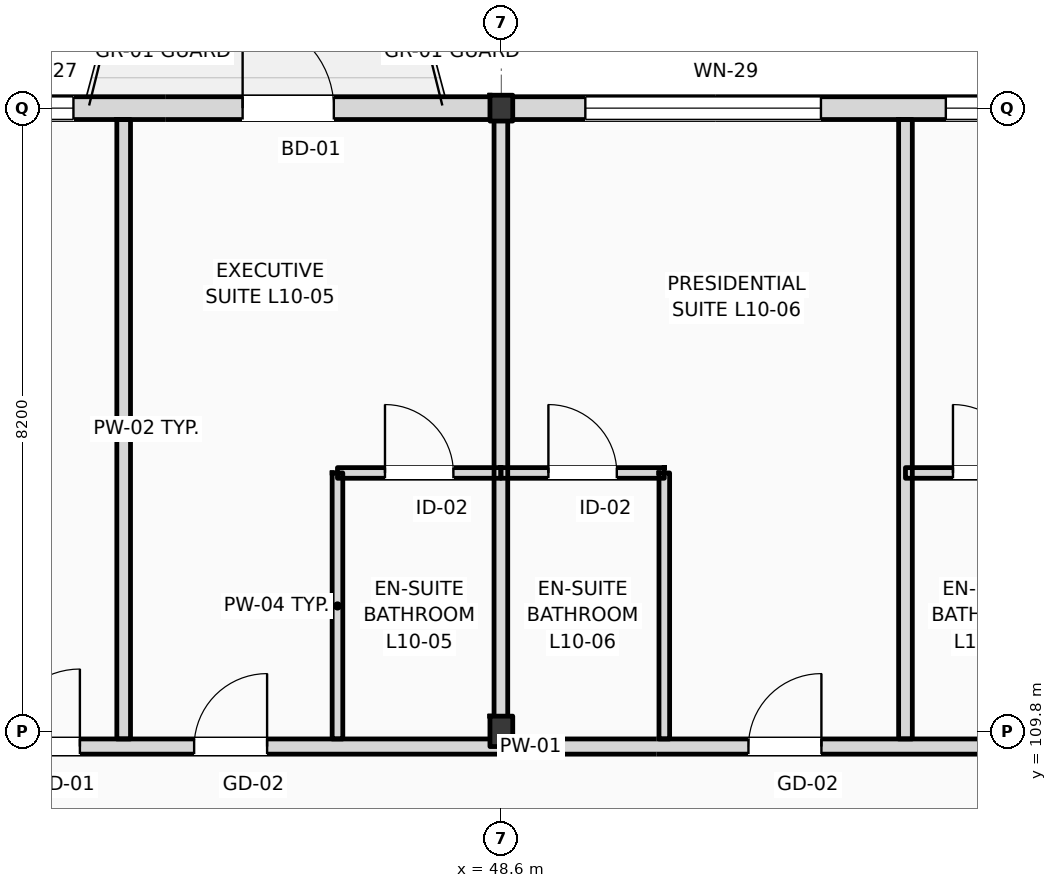
"""IFC4 building model, lengths in metres.
Left out: names, types, materials, properties, quantities, classifications, styles, units other than length and angle.
Written with IfcOpenShell. Run it as: python <this file> out.ifc"""

import sys

from ifc_helpers import new_model, si_unit, direction, frame, frame_2d, origin, origin_2d, place, context, subcontext, project, spatial, rectangle, i_section, extrude, element, fill, save


model = new_model("IFC4")
c1 = context("Model", 3, precision=1e-05, world=origin(), true_north=direction((0.0, 1.0)))
c2 = subcontext(c1, "Body", "Model", "MODEL_VIEW")
j1 = project(units=[si_unit("LENGTHUNIT", "METRE"), si_unit("PLANEANGLEUNIT", "RADIAN")], contexts=[c1])
p1 = place(None, origin())
s1 = spatial("IfcSite", under=j1, at=p1, CompositionType="ELEMENT")
p2 = place(p1, origin())
s2 = spatial("IfcBuilding", under=s1, at=p2, CompositionType="ELEMENT")
p3 = place(p2, frame((0.0, 0.0, 42.6)))
s3 = spatial("IfcBuildingStorey", under=s2, at=p3, CompositionType="ELEMENT", Elevation=42.6)
p4 = place(p3, frame((48.6, 109.8, 0.0), z_axis=(0.0, 0.0, 1.0), x_axis=(1.0, 0.0, 0.0)))
e1 = element("IfcColumn", 1, at=p4, inside=s3, PredefinedType="COLUMN", context=c2, shape_type="SweptSolid", body=[
    extrude(i_section(OverallWidth=0.3, OverallDepth=0.4, WebThickness=0.013, FlangeThickness=0.024, FilletRadius=0.027, at=origin_2d()), origin(), (0.0, 0.0, 1.0), 4.2),
])
p5 = place(p3, frame((48.6, 118.0, 0.0), z_axis=(0.0, 0.0, 1.0), x_axis=(1.0, 0.0, 0.0)))
e2 = element("IfcColumn", 2, at=p5, inside=s3, PredefinedType="COLUMN", context=c2, shape_type="SweptSolid", body=[
    extrude(i_section(OverallWidth=0.3, OverallDepth=0.34, WebThickness=0.012, FlangeThickness=0.021, FilletRadius=0.027, at=origin_2d()), origin(), (0.0, 0.0, 1.0), 4.2),
])
p6 = place(p3, frame((22.5, 118.0, 0.0), z_axis=(0.0, 0.0, 1.0), x_axis=(1.0, 0.0, 0.0)))
e3 = element("IfcWall", 3, at=p6, inside=s3, PredefinedType="STANDARD", context=c2, shape_type="SweptSolid", body=[
    extrude(rectangle(XDim=72.9, YDim=0.3, at=frame_2d((36.45, 0.0))), origin(), (0.0, 0.0, 1.0), 3.42),
])
p7 = place(p6, frame((3.611, 0.0, 0.9)))
e4 = element("IfcOpeningElement", 4, at=p7, cuts=e3, PredefinedType="OPENING", context=c2, shape_type="SweptSolid", body=[
    extrude(rectangle(XDim=1.35, YDim=1.75, at=frame_2d((0.675, 0.875))), frame((0.0, 0.16, 0.0), z_axis=(0.0, -1.0, 0.0), x_axis=(1.0, 0.0, 0.0)), (0.0, 0.0, 1.0), 0.32),
])
p8 = place(p6, frame((7.091, 0.0, 0.0)))
e5 = element("IfcOpeningElement", 5, at=p8, cuts=e3, PredefinedType="OPENING", context=c2, shape_type="SweptSolid", body=[
    extrude(rectangle(XDim=1.2, YDim=2.25, at=frame_2d((0.6, 1.125))), frame((0.0, 0.16, 0.0), z_axis=(0.0, -1.0, 0.0), x_axis=(1.0, 0.0, 0.0)), (0.0, 0.0, 1.0), 0.32),
])
p9 = place(p6, frame((12.328, 0.0, 0.9)))
e6 = element("IfcOpeningElement", 6, at=p9, cuts=e3, PredefinedType="OPENING", context=c2, shape_type="SweptSolid", body=[
    extrude(rectangle(XDim=2.0, YDim=2.34, at=frame_2d((1.0, 1.17))), frame((0.0, 0.16, 0.0), z_axis=(0.0, -1.0, 0.0), x_axis=(1.0, 0.0, 0.0)), (0.0, 0.0, 1.0), 0.32),
])
p10 = place(p6, frame((19.12, 0.0, 0.9)))
e7 = element("IfcOpeningElement", 7, at=p10, cuts=e3, PredefinedType="OPENING", context=c2, shape_type="SweptSolid", body=[
    extrude(rectangle(XDim=1.35, YDim=2.34, at=frame_2d((0.675, 1.17))), frame((0.0, 0.16, 0.0), z_axis=(0.0, -1.0, 0.0), x_axis=(1.0, 0.0, 0.0)), (0.0, 0.0, 1.0), 0.32),
])
p11 = place(p6, frame((22.696, 0.0, 0.0)))
e8 = element("IfcOpeningElement", 8, at=p11, cuts=e3, PredefinedType="OPENING", context=c2, shape_type="SweptSolid", body=[
    extrude(rectangle(XDim=1.2, YDim=2.25, at=frame_2d((0.6, 1.125))), frame((0.0, 0.16, 0.0), z_axis=(0.0, -1.0, 0.0), x_axis=(1.0, 0.0, 0.0)), (0.0, 0.0, 1.0), 0.32),
])
p12 = place(p6, frame((27.205, 0.0, 0.9)))
e9 = element("IfcOpeningElement", 9, at=p12, cuts=e3, PredefinedType="OPENING", context=c2, shape_type="SweptSolid", body=[
    extrude(rectangle(XDim=3.1, YDim=2.34, at=frame_2d((1.55, 1.17))), frame((0.0, 0.16, 0.0), z_axis=(0.0, -1.0, 0.0), x_axis=(1.0, 0.0, 0.0)), (0.0, 0.0, 1.0), 0.32),
])
p13 = place(p6, frame((31.948, 0.0, 0.9)))
e10 = element("IfcOpeningElement", 10, at=p13, cuts=e3, PredefinedType="OPENING", context=c2, shape_type="SweptSolid", body=[
    extrude(rectangle(XDim=1.1, YDim=2.34, at=frame_2d((0.55, 1.17))), frame((0.0, 0.16, 0.0), z_axis=(0.0, -1.0, 0.0), x_axis=(1.0, 0.0, 0.0)), (0.0, 0.0, 1.0), 0.32),
])
p14 = place(p6, frame((38.12, 0.0, 0.0)))
e11 = element("IfcOpeningElement", 11, at=p14, cuts=e3, PredefinedType="OPENING", context=c2, shape_type="SweptSolid", body=[
    extrude(rectangle(XDim=1.2, YDim=2.25, at=frame_2d((0.6, 1.125))), frame((0.0, 0.16, 0.0), z_axis=(0.0, -1.0, 0.0), x_axis=(1.0, 0.0, 0.0)), (0.0, 0.0, 1.0), 0.32),
])
p15 = place(p6, frame((43.51, 0.0, 0.9)))
e12 = element("IfcOpeningElement", 12, at=p15, cuts=e3, PredefinedType="OPENING", context=c2, shape_type="SweptSolid", body=[
    extrude(rectangle(XDim=1.35, YDim=1.85, at=frame_2d((0.675, 0.925))), frame((0.0, 0.16, 0.0), z_axis=(0.0, -1.0, 0.0), x_axis=(1.0, 0.0, 0.0)), (0.0, 0.0, 1.0), 0.32),
])
p16 = place(p6, frame((47.178, 0.0, 0.9)))
e13 = element("IfcOpeningElement", 13, at=p16, cuts=e3, PredefinedType="OPENING", context=c2, shape_type="SweptSolid", body=[
    extrude(rectangle(XDim=1.5, YDim=1.9, at=frame_2d((0.75, 0.95))), frame((0.0, 0.16, 0.0), z_axis=(0.0, -1.0, 0.0), x_axis=(1.0, 0.0, 0.0)), (0.0, 0.0, 1.0), 0.32),
])
p17 = place(p6, frame((53.724, 0.0, 0.0)))
e14 = element("IfcOpeningElement", 14, at=p17, cuts=e3, PredefinedType="OPENING", context=c2, shape_type="SweptSolid", body=[
    extrude(rectangle(XDim=1.2, YDim=2.25, at=frame_2d((0.6, 1.125))), frame((0.0, 0.16, 0.0), z_axis=(0.0, -1.0, 0.0), x_axis=(1.0, 0.0, 0.0)), (0.0, 0.0, 1.0), 0.32),
])
p18 = place(p6, frame((58.712, 0.0, 0.9)))
e15 = element("IfcOpeningElement", 15, at=p18, cuts=e3, PredefinedType="OPENING", context=c2, shape_type="SweptSolid", body=[
    extrude(rectangle(XDim=1.8, YDim=2.0, at=frame_2d((0.9, 1.0))), frame((0.0, 0.16, 0.0), z_axis=(0.0, -1.0, 0.0), x_axis=(1.0, 0.0, 0.0)), (0.0, 0.0, 1.0), 0.32),
])
p19 = place(p6, frame((62.781, 0.0, 0.9)))
e16 = element("IfcOpeningElement", 16, at=p19, cuts=e3, PredefinedType="OPENING", context=c2, shape_type="SweptSolid", body=[
    extrude(rectangle(XDim=1.35, YDim=2.05, at=frame_2d((0.675, 1.025))), frame((0.0, 0.16, 0.0), z_axis=(0.0, -1.0, 0.0), x_axis=(1.0, 0.0, 0.0)), (0.0, 0.0, 1.0), 0.32),
])
p20 = place(p6, frame((68.819, 0.0, 0.9)))
e17 = element("IfcOpeningElement", 17, at=p20, cuts=e3, PredefinedType="OPENING", context=c2, shape_type="SweptSolid", body=[
    extrude(rectangle(XDim=2.1, YDim=2.1, at=frame_2d((1.05, 1.05))), frame((0.0, 0.16, 0.0), z_axis=(0.0, -1.0, 0.0), x_axis=(1.0, 0.0, 0.0)), (0.0, 0.0, 1.0), 0.32),
])
p21 = place(p3, frame((10.65, 109.6, 0.0), z_axis=(0.0, 0.0, 1.0), x_axis=(1.0, 0.0, 0.0)))
e18 = element("IfcWall", 18, at=p21, inside=s3, PredefinedType="PARTITIONING", context=c2, shape_type="SweptSolid", body=[
    extrude(rectangle(XDim=84.61, YDim=0.2, at=frame_2d((42.305, 0.0))), origin(), (0.0, 0.0, 1.0), 3.38),
])
p22 = place(p21, frame((15.926, 0.0, 0.0)))
e19 = element("IfcOpeningElement", 19, at=p22, cuts=e18, PredefinedType="OPENING", context=c2, shape_type="SweptSolid", body=[
    extrude(rectangle(XDim=1.02, YDim=2.2, at=frame_2d((0.51, 1.1))), frame((0.0, 0.11, 0.0), z_axis=(0.0, -1.0, 0.0), x_axis=(1.0, 0.0, 0.0)), (0.0, 0.0, 1.0), 0.22),
])
p23 = place(p21, frame((18.45, 0.0, 0.0)))
e20 = element("IfcOpeningElement", 20, at=p23, cuts=e18, PredefinedType="OPENING", context=c2, shape_type="SweptSolid", body=[
    extrude(rectangle(XDim=1.02, YDim=2.2, at=frame_2d((0.51, 1.1))), frame((0.0, 0.11, 0.0), z_axis=(0.0, -1.0, 0.0), x_axis=(1.0, 0.0, 0.0)), (0.0, 0.0, 1.0), 0.22),
])
p24 = place(p21, frame((25.742, 0.0, 0.0)))
e21 = element("IfcOpeningElement", 21, at=p24, cuts=e18, PredefinedType="OPENING", context=c2, shape_type="SweptSolid", body=[
    extrude(rectangle(XDim=1.02, YDim=2.2, at=frame_2d((0.51, 1.1))), frame((0.0, 0.11, 0.0), z_axis=(0.0, -1.0, 0.0), x_axis=(1.0, 0.0, 0.0)), (0.0, 0.0, 1.0), 0.22),
])
p25 = place(p21, frame((31.385, 0.0, 0.0)))
e22 = element("IfcOpeningElement", 22, at=p25, cuts=e18, PredefinedType="OPENING", context=c2, shape_type="SweptSolid", body=[
    extrude(rectangle(XDim=1.02, YDim=2.2, at=frame_2d((0.51, 1.1))), frame((0.0, 0.11, 0.0), z_axis=(0.0, -1.0, 0.0), x_axis=(1.0, 0.0, 0.0)), (0.0, 0.0, 1.0), 0.22),
])
p26 = place(p21, frame((33.908, 0.0, 0.0)))
e23 = element("IfcOpeningElement", 23, at=p26, cuts=e18, PredefinedType="OPENING", context=c2, shape_type="SweptSolid", body=[
    extrude(rectangle(XDim=0.96, YDim=2.2, at=frame_2d((0.48, 1.1))), frame((0.0, 0.11, 0.0), z_axis=(0.0, -1.0, 0.0), x_axis=(1.0, 0.0, 0.0)), (0.0, 0.0, 1.0), 0.22),
])
p27 = place(p21, frame((41.201, 0.0, 0.0)))
e24 = element("IfcOpeningElement", 24, at=p27, cuts=e18, PredefinedType="OPENING", context=c2, shape_type="SweptSolid", body=[
    extrude(rectangle(XDim=0.96, YDim=2.2, at=frame_2d((0.48, 1.1))), frame((0.0, 0.11, 0.0), z_axis=(0.0, -1.0, 0.0), x_axis=(1.0, 0.0, 0.0)), (0.0, 0.0, 1.0), 0.22),
])
p28 = place(p21, frame((46.844, 0.0, 0.0)))
e25 = element("IfcOpeningElement", 25, at=p28, cuts=e18, PredefinedType="OPENING", context=c2, shape_type="SweptSolid", body=[
    extrude(rectangle(XDim=0.96, YDim=2.2, at=frame_2d((0.48, 1.1))), frame((0.0, 0.11, 0.0), z_axis=(0.0, -1.0, 0.0), x_axis=(1.0, 0.0, 0.0)), (0.0, 0.0, 1.0), 0.22),
])
p29 = place(p21, frame((49.337, 0.0, 0.0)))
e26 = element("IfcOpeningElement", 26, at=p29, cuts=e18, PredefinedType="OPENING", context=c2, shape_type="SweptSolid", body=[
    extrude(rectangle(XDim=0.96, YDim=2.2, at=frame_2d((0.48, 1.1))), frame((0.0, 0.11, 0.0), z_axis=(0.0, -1.0, 0.0), x_axis=(1.0, 0.0, 0.0)), (0.0, 0.0, 1.0), 0.22),
])
p30 = place(p21, frame((56.63, 0.0, 0.0)))
e27 = element("IfcOpeningElement", 27, at=p30, cuts=e18, PredefinedType="OPENING", context=c2, shape_type="SweptSolid", body=[
    extrude(rectangle(XDim=0.96, YDim=2.2, at=frame_2d((0.48, 1.1))), frame((0.0, 0.11, 0.0), z_axis=(0.0, -1.0, 0.0), x_axis=(1.0, 0.0, 0.0)), (0.0, 0.0, 1.0), 0.22),
])
p31 = place(p21, frame((62.523, 0.0, 0.0)))
e28 = element("IfcOpeningElement", 28, at=p31, cuts=e18, PredefinedType="OPENING", context=c2, shape_type="SweptSolid", body=[
    extrude(rectangle(XDim=0.96, YDim=2.2, at=frame_2d((0.48, 1.1))), frame((0.0, 0.11, 0.0), z_axis=(0.0, -1.0, 0.0), x_axis=(1.0, 0.0, 0.0)), (0.0, 0.0, 1.0), 0.22),
])
p32 = place(p21, frame((64.765, 0.0, 0.0)))
e29 = element("IfcOpeningElement", 29, at=p32, cuts=e18, PredefinedType="OPENING", context=c2, shape_type="SweptSolid", body=[
    extrude(rectangle(XDim=0.96, YDim=2.2, at=frame_2d((0.48, 1.1))), frame((0.0, 0.11, 0.0), z_axis=(0.0, -1.0, 0.0), x_axis=(1.0, 0.0, 0.0)), (0.0, 0.0, 1.0), 0.22),
])
p33 = place(p21, frame((72.057, 0.0, 0.0)))
e30 = element("IfcOpeningElement", 30, at=p33, cuts=e18, PredefinedType="OPENING", context=c2, shape_type="SweptSolid", body=[
    extrude(rectangle(XDim=0.96, YDim=2.2, at=frame_2d((0.48, 1.1))), frame((0.0, 0.11, 0.0), z_axis=(0.0, -1.0, 0.0), x_axis=(1.0, 0.0, 0.0)), (0.0, 0.0, 1.0), 0.22),
])
p34 = place(p21, frame((74.55, 0.0, 0.0)))
e31 = element("IfcOpeningElement", 31, at=p34, cuts=e18, PredefinedType="OPENING", context=c2, shape_type="SweptSolid", body=[
    extrude(rectangle(XDim=0.96, YDim=2.2, at=frame_2d((0.48, 1.1))), frame((0.0, 0.11, 0.0), z_axis=(0.0, -1.0, 0.0), x_axis=(1.0, 0.0, 0.0)), (0.0, 0.0, 1.0), 0.22),
])
p35 = place(p21, frame((80.163, 0.0, 0.0)))
e32 = element("IfcOpeningElement", 32, at=p35, cuts=e18, PredefinedType="OPENING", context=c2, shape_type="SweptSolid", body=[
    extrude(rectangle(XDim=0.96, YDim=2.2, at=frame_2d((0.48, 1.1))), frame((0.0, 0.11, 0.0), z_axis=(0.0, -1.0, 0.0), x_axis=(1.0, 0.0, 0.0)), (0.0, 0.0, 1.0), 0.22),
])
p36 = place(p21, frame((2.716, 0.0, 0.0)))
e33 = element("IfcOpeningElement", 33, at=p36, cuts=e18, PredefinedType="OPENING", context=c2, shape_type="SweptSolid", body=[
    extrude(rectangle(XDim=1.35, YDim=2.25, at=frame_2d((0.675, 1.125))), frame((0.0, 0.11, 0.0), z_axis=(0.0, -1.0, 0.0), x_axis=(1.0, 0.0, 0.0)), (0.0, 0.0, 1.0), 0.22),
])
p37 = place(p21, frame((6.65, 0.0, 0.0)))
e34 = element("IfcOpeningElement", 34, at=p37, cuts=e18, PredefinedType="OPENING", context=c2, shape_type="SweptSolid", body=[
    extrude(rectangle(XDim=1.35, YDim=2.25, at=frame_2d((0.675, 1.125))), frame((0.0, 0.11, 0.0), z_axis=(0.0, -1.0, 0.0), x_axis=(1.0, 0.0, 0.0)), (0.0, 0.0, 1.0), 0.22),
])
p38 = place(p21, frame((10.583, 0.0, 0.0)))
e35 = element("IfcOpeningElement", 35, at=p38, cuts=e18, PredefinedType="OPENING", context=c2, shape_type="SweptSolid", body=[
    extrude(rectangle(XDim=1.35, YDim=2.25, at=frame_2d((0.675, 1.125))), frame((0.0, 0.11, 0.0), z_axis=(0.0, -1.0, 0.0), x_axis=(1.0, 0.0, 0.0)), (0.0, 0.0, 1.0), 0.22),
])
p39 = place(p3, frame((43.631, 109.7, 0.0), z_axis=(0.0, 0.0, 1.0), x_axis=(0.0, 1.0, 0.0)))
e36 = element("IfcWall", 36, at=p39, inside=s3, PredefinedType="PARTITIONING", context=c2, shape_type="SweptSolid", body=[
    extrude(rectangle(XDim=8.15, YDim=0.18, at=frame_2d((4.075, 0.0))), origin(), (0.0, 0.0, 1.0), 3.63),
])
p40 = place(p3, frame((48.594, 109.7, 0.0), z_axis=(0.0, 0.0, 1.0), x_axis=(0.0, 1.0, 0.0)))
e37 = element("IfcWall", 37, at=p40, inside=s3, PredefinedType="PARTITIONING", context=c2, shape_type="SweptSolid", body=[
    extrude(rectangle(XDim=8.15, YDim=0.18, at=frame_2d((4.075, 0.0))), origin(), (0.0, 0.0, 1.0), 3.57),
])
p41 = place(p3, frame((46.444, 109.7, 0.0), z_axis=(0.0, 0.0, 1.0), x_axis=(0.0, 1.0, 0.0)))
e38 = element("IfcWall", 38, at=p41, inside=s3, PredefinedType="PARTITIONING", context=c2, shape_type="SweptSolid", body=[
    extrude(rectangle(XDim=3.5, YDim=0.14, at=frame_2d((1.75, 0.0))), origin(), (0.0, 0.0, 1.0), 3.94),
])
p42 = place(p3, frame((46.444, 113.2, 0.0), z_axis=(0.0, 0.0, 1.0), x_axis=(1.0, 0.0, 0.0)))
e39 = element("IfcWall", 39, at=p42, inside=s3, PredefinedType="PARTITIONING", context=c2, shape_type="SweptSolid", body=[
    extrude(rectangle(XDim=2.15, YDim=0.14, at=frame_2d((1.075, 0.0))), origin(), (0.0, 0.0, 1.0), 3.94),
])
p43 = place(p42, frame((0.625, 0.0, 0.0)))
e40 = element("IfcOpeningElement", 40, at=p43, cuts=e39, PredefinedType="OPENING", context=c2, shape_type="SweptSolid", body=[
    extrude(rectangle(XDim=0.9, YDim=2.1, at=frame_2d((0.45, 1.05))), frame((0.0, 0.08, 0.0), z_axis=(0.0, -1.0, 0.0), x_axis=(1.0, 0.0, 0.0)), (0.0, 0.0, 1.0), 0.16),
])
p44 = place(p3, frame((53.917, 109.7, 0.0), z_axis=(0.0, 0.0, 1.0), x_axis=(0.0, 1.0, 0.0)))
e41 = element("IfcWall", 41, at=p44, inside=s3, PredefinedType="PARTITIONING", context=c2, shape_type="SweptSolid", body=[
    extrude(rectangle(XDim=8.15, YDim=0.18, at=frame_2d((4.075, 0.0))), origin(), (0.0, 0.0, 1.0), 3.63),
])
p45 = place(p3, frame((50.744, 109.7, 0.0), z_axis=(0.0, 0.0, 1.0), x_axis=(0.0, 1.0, 0.0)))
e42 = element("IfcWall", 42, at=p45, inside=s3, PredefinedType="PARTITIONING", context=c2, shape_type="SweptSolid", body=[
    extrude(rectangle(XDim=3.5, YDim=0.14, at=frame_2d((1.75, 0.0))), origin(), (0.0, 0.0, 1.0), 3.94),
])
p46 = place(p3, frame((48.594, 113.2, 0.0), z_axis=(0.0, 0.0, 1.0), x_axis=(1.0, 0.0, 0.0)))
e43 = element("IfcWall", 43, at=p46, inside=s3, PredefinedType="PARTITIONING", context=c2, shape_type="SweptSolid", body=[
    extrude(rectangle(XDim=2.15, YDim=0.14, at=frame_2d((1.075, 0.0))), origin(), (0.0, 0.0, 1.0), 3.94),
])
p47 = place(p46, frame((0.625, 0.0, 0.0)))
e44 = element("IfcOpeningElement", 44, at=p47, cuts=e43, PredefinedType="OPENING", context=c2, shape_type="SweptSolid", body=[
    extrude(rectangle(XDim=0.9, YDim=2.1, at=frame_2d((0.45, 1.05))), frame((0.0, 0.08, 0.0), z_axis=(0.0, -1.0, 0.0), x_axis=(1.0, 0.0, 0.0)), (0.0, 0.0, 1.0), 0.16),
])
p48 = place(p3, frame((53.917, 113.2, 0.0), z_axis=(0.0, 0.0, 1.0), x_axis=(1.0, 0.0, 0.0)))
e45 = element("IfcWall", 45, at=p48, inside=s3, PredefinedType="PARTITIONING", context=c2, shape_type="SweptSolid", body=[
    extrude(rectangle(XDim=2.15, YDim=0.14, at=frame_2d((1.075, 0.0))), origin(), (0.0, 0.0, 1.0), 3.94),
])
p49 = place(p48, frame((0.625, 0.0, 0.0)))
e46 = element("IfcOpeningElement", 46, at=p49, cuts=e45, PredefinedType="OPENING", context=c2, shape_type="SweptSolid", body=[
    extrude(rectangle(XDim=0.9, YDim=2.1, at=frame_2d((0.45, 1.05))), frame((0.0, 0.08, 0.0), z_axis=(0.0, -1.0, 0.0), x_axis=(1.0, 0.0, 0.0)), (0.0, 0.0, 1.0), 0.16),
])
p50 = place(p10, origin())
e47 = element("IfcWindow", 47, at=p50, inside=s3, PartitioningType="DOUBLE_PANEL_VERTICAL", PredefinedType="WINDOW", context=c2, shape_type="SweptSolid", body=[
    extrude(rectangle(XDim=1.35, YDim=2.34, at=frame_2d((0.675, 1.17))), frame((0.0, 0.03, 0.0), z_axis=(0.0, -1.0, 0.0), x_axis=(1.0, 0.0, 0.0)), (0.0, 0.0, 1.0), 0.06),
])
fill(e7, e47)
p51 = place(p11, origin())
e48 = element("IfcDoor", 48, at=p51, inside=s3, OperationType="SINGLE_SWING_LEFT", PredefinedType="DOOR", context=c2, shape_type="SweptSolid", body=[
    extrude(rectangle(XDim=1.2, YDim=2.25, at=frame_2d((0.6, 1.125))), frame((0.0, 0.025, 0.0), z_axis=(0.0, -1.0, 0.0), x_axis=(1.0, 0.0, 0.0)), (0.0, 0.0, 1.0), 0.05),
])
fill(e8, e48)
p52 = place(p12, origin())
e49 = element("IfcWindow", 49, at=p52, inside=s3, PartitioningType="DOUBLE_PANEL_VERTICAL", PredefinedType="WINDOW", context=c2, shape_type="SweptSolid", body=[
    extrude(rectangle(XDim=3.1, YDim=2.34, at=frame_2d((1.55, 1.17))), frame((0.0, 0.03, 0.0), z_axis=(0.0, -1.0, 0.0), x_axis=(1.0, 0.0, 0.0)), (0.0, 0.0, 1.0), 0.06),
])
fill(e9, e49)
p53 = place(p13, origin())
e50 = element("IfcWindow", 50, at=p53, inside=s3, PartitioningType="DOUBLE_PANEL_VERTICAL", PredefinedType="WINDOW", context=c2, shape_type="SweptSolid", body=[
    extrude(rectangle(XDim=1.1, YDim=2.34, at=frame_2d((0.55, 1.17))), frame((0.0, 0.03, 0.0), z_axis=(0.0, -1.0, 0.0), x_axis=(1.0, 0.0, 0.0)), (0.0, 0.0, 1.0), 0.06),
])
fill(e10, e50)
p54 = place(p25, origin())
e51 = element("IfcDoor", 51, at=p54, inside=s3, OperationType="SINGLE_SWING_RIGHT", PredefinedType="DOOR", context=c2, shape_type="SweptSolid", body=[
    extrude(rectangle(XDim=1.02, YDim=2.2, at=frame_2d((0.51, 1.1))), frame((0.0, 0.025, 0.0), z_axis=(0.0, -1.0, 0.0), x_axis=(1.0, 0.0, 0.0)), (0.0, 0.0, 1.0), 0.05),
])
fill(e22, e51)
p55 = place(p26, origin())
e52 = element("IfcDoor", 52, at=p55, inside=s3, OperationType="SINGLE_SWING_RIGHT", PredefinedType="DOOR", context=c2, shape_type="SweptSolid", body=[
    extrude(rectangle(XDim=0.96, YDim=2.2, at=frame_2d((0.48, 1.1))), frame((0.0, 0.025, 0.0), z_axis=(0.0, -1.0, 0.0), x_axis=(1.0, 0.0, 0.0)), (0.0, 0.0, 1.0), 0.05),
])
fill(e23, e52)
p56 = place(p43, origin())
e53 = element("IfcDoor", 53, at=p56, inside=s3, OperationType="SINGLE_SWING_LEFT", PredefinedType="DOOR", context=c2, shape_type="SweptSolid", body=[
    extrude(rectangle(XDim=0.9, YDim=2.1, at=frame_2d((0.45, 1.05))), frame((0.0, 0.025, 0.0), z_axis=(0.0, -1.0, 0.0), x_axis=(1.0, 0.0, 0.0)), (0.0, 0.0, 1.0), 0.05),
])
fill(e40, e53)
p57 = place(p27, origin())
e54 = element("IfcDoor", 54, at=p57, inside=s3, OperationType="SINGLE_SWING_RIGHT", PredefinedType="DOOR", context=c2, shape_type="SweptSolid", body=[
    extrude(rectangle(XDim=0.96, YDim=2.2, at=frame_2d((0.48, 1.1))), frame((0.0, 0.025, 0.0), z_axis=(0.0, -1.0, 0.0), x_axis=(1.0, 0.0, 0.0)), (0.0, 0.0, 1.0), 0.05),
])
fill(e24, e54)
p58 = place(p47, origin())
e55 = element("IfcDoor", 55, at=p58, inside=s3, OperationType="SINGLE_SWING_LEFT", PredefinedType="DOOR", context=c2, shape_type="SweptSolid", body=[
    extrude(rectangle(XDim=0.9, YDim=2.1, at=frame_2d((0.45, 1.05))), frame((0.0, 0.025, 0.0), z_axis=(0.0, -1.0, 0.0), x_axis=(1.0, 0.0, 0.0)), (0.0, 0.0, 1.0), 0.05),
])
fill(e44, e55)
p59 = place(p49, origin())
e56 = element("IfcDoor", 56, at=p59, inside=s3, OperationType="SINGLE_SWING_LEFT", PredefinedType="DOOR", context=c2, shape_type="SweptSolid", body=[
    extrude(rectangle(XDim=0.9, YDim=2.1, at=frame_2d((0.45, 1.05))), frame((0.0, 0.025, 0.0), z_axis=(0.0, -1.0, 0.0), x_axis=(1.0, 0.0, 0.0)), (0.0, 0.0, 1.0), 0.05),
])
fill(e46, e56)
save(model, sys.argv[1])
